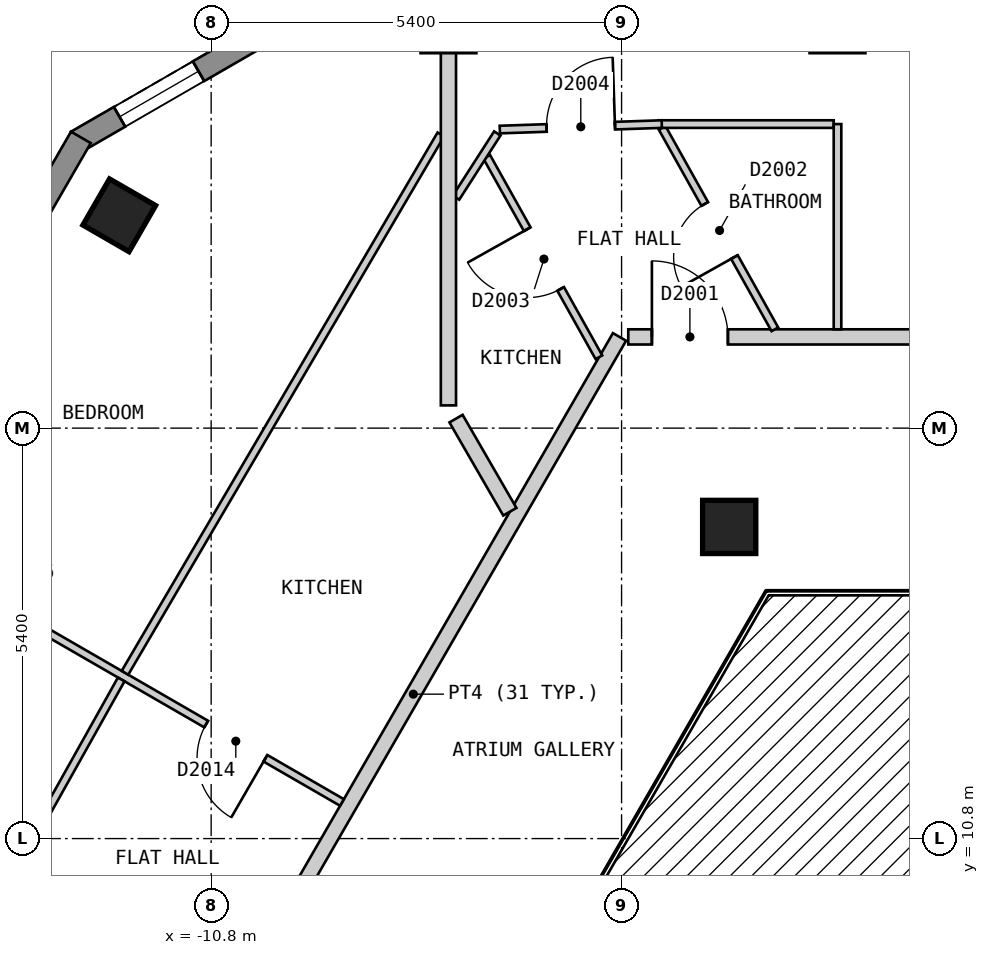
"""IFC4 building model, lengths in metres.
Left out: names, types, materials, properties, quantities, classifications, styles, units other than length and angle.
Written with IfcOpenShell. Run it as: python <this file> out.ifc"""

import sys

from ifc_helpers import new_model, si_unit, direction, frame, frame_2d, origin, origin_2d, place, context, subcontext, project, spatial, polyline, rectangle, outline, extrude, element, fill, save


model = new_model("IFC4")
c1 = context("Model", 3, precision=1e-05, world=origin(), true_north=direction((0.0, 1.0)))
c2 = subcontext(c1, "Body", "Model", "MODEL_VIEW")
j1 = project(units=[si_unit("LENGTHUNIT", "METRE"), si_unit("PLANEANGLEUNIT", "RADIAN")], contexts=[c1])
p1 = place(None, origin())
s1 = spatial("IfcSite", under=j1, at=p1, CompositionType="ELEMENT")
p2 = place(p1, origin())
s2 = spatial("IfcBuilding", under=s1, at=p2, CompositionType="ELEMENT")
p3 = place(p2, frame((0.0, 0.0, 238.8)))
s3 = spatial("IfcBuildingStorey", under=s2, at=p3, CompositionType="ELEMENT", Elevation=238.8)
for number, where, z_axis, x_axis in (
    (1, (-12.009, 19.0, 0.0), (0.0, 0.0, 1.0), (-0.5, -0.866, 0.0)),
    (2, (-3.984, 14.9, 0.0), (0.0, 0.0, 1.0), (1.0, 0.0, 0.0)),
):
    element("IfcColumn", number, at=place(p3, frame(where, z_axis=z_axis, x_axis=x_axis)), inside=s3, PredefinedType="COLUMN", context=c2, shape_type="SweptSolid", body=[
        extrude(rectangle(XDim=0.7, YDim=0.7, at=origin_2d()), origin(), (0.0, 0.0, 1.0), 3.0),
    ])
p4 = place(p3, frame((-8.239, 22.47, 0.0), z_axis=(0.0, 0.0, 1.0), x_axis=(-0.866022959057, -0.500004234368, 0.0)))
e3 = element("IfcWall", 3, at=p4, inside=s3, PredefinedType="SOLIDWALL", context=c2, shape_type="SweptSolid", body=[
    extrude(outline(polyline([(0.0, -0.15), (5.0, -0.15), (4.92, 0.15), (0.08, 0.15), (0.0, -0.15)])), origin(), (0.0, 0.0, 1.0), 2.7),
])
p5 = place(p4, frame((0.65, 0.0, 0.15)))
e4 = element("IfcOpeningElement", 4, at=p5, cuts=e3, PredefinedType="OPENING", context=c2, shape_type="SweptSolid", body=[
    extrude(rectangle(XDim=1.2, YDim=2.1, at=frame_2d((0.6, 1.05))), frame((0.0, 0.16, 0.0), z_axis=(0.0, -1.0, 0.0), x_axis=(1.0, 0.0, 0.0)), (0.0, 0.0, 1.0), 0.32),
])
p6 = place(p4, frame((3.149, 0.0, 0.15)))
e5 = element("IfcOpeningElement", 5, at=p6, cuts=e3, PredefinedType="OPENING", context=c2, shape_type="SweptSolid", body=[
    extrude(rectangle(XDim=1.2, YDim=2.1, at=frame_2d((0.6, 1.05))), frame((0.0, 0.16, 0.0), z_axis=(0.0, -1.0, 0.0), x_axis=(1.0, 0.0, 0.0)), (0.0, 0.0, 1.0), 0.32),
])
p7 = place(p3, frame((-12.514, 20.025, 0.0), z_axis=(0.0, 0.0, 1.0), x_axis=(-0.500003656944, -0.866023292436, 0.0)))
e6 = element("IfcWall", 6, at=p7, inside=s3, PredefinedType="SOLIDWALL", context=c2, shape_type="SweptSolid", body=[
    extrude(outline(polyline([(0.0, -0.15), (22.17, -0.15), (22.09, 0.15), (0.08, 0.15), (0.0, -0.15)])), origin(), (0.0, 0.0, 1.0), 2.7),
])
p8 = place(p7, frame((1.191, 0.0, 0.15)))
e7 = element("IfcOpeningElement", 7, at=p8, cuts=e6, PredefinedType="OPENING", context=c2, shape_type="SweptSolid", body=[
    extrude(rectangle(XDim=1.5, YDim=2.1, at=frame_2d((0.75, 1.05))), frame((0.0, 0.16, 0.0), z_axis=(0.0, -1.0, 0.0), x_axis=(1.0, 0.0, 0.0)), (0.0, 0.0, 1.0), 0.32),
])
p9 = place(p7, frame((3.804, 0.0, 0.15)))
e8 = element("IfcOpeningElement", 8, at=p9, cuts=e6, PredefinedType="OPENING", context=c2, shape_type="SweptSolid", body=[
    extrude(rectangle(XDim=1.5, YDim=2.1, at=frame_2d((0.75, 1.05))), frame((0.0, 0.16, 0.0), z_axis=(0.0, -1.0, 0.0), x_axis=(1.0, 0.0, 0.0)), (0.0, 0.0, 1.0), 0.32),
])
p10 = place(p7, frame((6.416, 0.0, 0.15)))
e9 = element("IfcOpeningElement", 9, at=p10, cuts=e6, PredefinedType="OPENING", context=c2, shape_type="SweptSolid", body=[
    extrude(rectangle(XDim=1.5, YDim=2.1, at=frame_2d((0.75, 1.05))), frame((0.0, 0.16, 0.0), z_axis=(0.0, -1.0, 0.0), x_axis=(1.0, 0.0, 0.0)), (0.0, 0.0, 1.0), 0.32),
])
p11 = place(p7, frame((9.029, 0.0, 0.15)))
e10 = element("IfcOpeningElement", 10, at=p11, cuts=e6, PredefinedType="OPENING", context=c2, shape_type="SweptSolid", body=[
    extrude(rectangle(XDim=1.5, YDim=2.1, at=frame_2d((0.75, 1.05))), frame((0.0, 0.16, 0.0), z_axis=(0.0, -1.0, 0.0), x_axis=(1.0, 0.0, 0.0)), (0.0, 0.0, 1.0), 0.32),
])
p12 = place(p7, frame((11.641, 0.0, 0.15)))
e11 = element("IfcOpeningElement", 11, at=p12, cuts=e6, PredefinedType="OPENING", context=c2, shape_type="SweptSolid", body=[
    extrude(rectangle(XDim=1.5, YDim=2.1, at=frame_2d((0.75, 1.05))), frame((0.0, 0.16, 0.0), z_axis=(0.0, -1.0, 0.0), x_axis=(1.0, 0.0, 0.0)), (0.0, 0.0, 1.0), 0.32),
])
p13 = place(p7, frame((14.254, 0.0, 0.15)))
e12 = element("IfcOpeningElement", 12, at=p13, cuts=e6, PredefinedType="OPENING", context=c2, shape_type="SweptSolid", body=[
    extrude(rectangle(XDim=1.5, YDim=2.1, at=frame_2d((0.75, 1.05))), frame((0.0, 0.16, 0.0), z_axis=(0.0, -1.0, 0.0), x_axis=(1.0, 0.0, 0.0)), (0.0, 0.0, 1.0), 0.32),
])
p14 = place(p7, frame((16.866, 0.0, 0.15)))
e13 = element("IfcOpeningElement", 13, at=p14, cuts=e6, PredefinedType="OPENING", context=c2, shape_type="SweptSolid", body=[
    extrude(rectangle(XDim=1.5, YDim=2.1, at=frame_2d((0.75, 1.05))), frame((0.0, 0.16, 0.0), z_axis=(0.0, -1.0, 0.0), x_axis=(1.0, 0.0, 0.0)), (0.0, 0.0, 1.0), 0.32),
])
p15 = place(p7, frame((19.479, 0.0, 0.15)))
e14 = element("IfcOpeningElement", 14, at=p15, cuts=e6, PredefinedType="OPENING", context=c2, shape_type="SweptSolid", body=[
    extrude(rectangle(XDim=1.5, YDim=2.1, at=frame_2d((0.75, 1.05))), frame((0.0, 0.16, 0.0), z_axis=(0.0, -1.0, 0.0), x_axis=(1.0, 0.0, 0.0)), (0.0, 0.0, 1.0), 0.32),
])
p16 = place(p3, frame((-5.312, 17.4, 0.0), z_axis=(0.0, 0.0, 1.0), x_axis=(1.0, 0.0, 0.0)))
e15 = element("IfcWall", 15, at=p16, inside=s3, PredefinedType="PARTITIONING", context=c2, shape_type="SweptSolid", body=[
    extrude(rectangle(XDim=10.739, YDim=0.2, at=frame_2d((5.37, 0.0))), origin(), (0.0, 0.0, 1.0), 2.7),
])
p17 = place(p16, frame((0.311, 0.0, 0.0)))
e16 = element("IfcOpeningElement", 16, at=p17, cuts=e15, PredefinedType="OPENING", context=c2, shape_type="SweptSolid", body=[
    extrude(rectangle(XDim=1.0, YDim=2.1, at=frame_2d((0.5, 1.05))), frame((0.0, 0.11, 0.0), z_axis=(0.0, -1.0, 0.0), x_axis=(1.0, 0.0, 0.0)), (0.0, 0.0, 1.0), 0.22),
])
p18 = place(p3, frame((-10.854, 8.0, 0.0), z_axis=(0.0, 0.0, 1.0), x_axis=(0.499997637144, 0.866026767976, 0.0)))
e17 = element("IfcWall", 17, at=p18, inside=s3, PredefinedType="PARTITIONING", context=c2, shape_type="SweptSolid", body=[
    extrude(rectangle(XDim=10.854, YDim=0.2, at=frame_2d((5.427, 0.0))), origin(), (0.0, 0.0, 1.0), 2.7),
])
p19 = place(p18, frame((0.612, 0.0, 0.0)))
e18 = element("IfcOpeningElement", 18, at=p19, cuts=e17, PredefinedType="OPENING", context=c2, shape_type="SweptSolid", body=[
    extrude(rectangle(XDim=1.0, YDim=2.1, at=frame_2d((0.5, 1.05))), frame((0.0, 0.11, 0.0), z_axis=(0.0, -1.0, 0.0), x_axis=(1.0, 0.0, 0.0)), (0.0, 0.0, 1.0), 0.22),
])
p20 = place(p3, frame((-7.174, 19.769, 0.0), z_axis=(0.0, 0.0, 1.0), x_axis=(0.488445917321, -0.872594170192, 0.0)))
e19 = element("IfcWall", 19, at=p20, inside=s3, PredefinedType="PARTITIONING", context=c2, shape_type="SweptSolid", body=[
    extrude(rectangle(XDim=3.022, YDim=0.1, at=frame_2d((1.511, 0.0))), origin(), (0.0, 0.0, 1.0), 2.7),
])
p21 = place(p20, frame((1.091, 0.0, 0.0)))
e20 = element("IfcOpeningElement", 20, at=p21, cuts=e19, PredefinedType="OPENING", context=c2, shape_type="SweptSolid", body=[
    extrude(rectangle(XDim=0.9, YDim=2.1, at=frame_2d((0.45, 1.05))), frame((0.0, 0.06, 0.0), z_axis=(0.0, -1.0, 0.0), x_axis=(1.0, 0.0, 0.0)), (0.0, 0.0, 1.0), 0.12),
])
p22 = place(p3, frame((-4.866, 20.15, 0.0), z_axis=(0.0, 0.0, 1.0), x_axis=(0.488343837593, -0.872651302804, 0.0)))
e21 = element("IfcWall", 21, at=p22, inside=s3, PredefinedType="PARTITIONING", context=c2, shape_type="SweptSolid", body=[
    extrude(rectangle(XDim=3.037, YDim=0.1, at=frame_2d((1.518, 0.0))), origin(), (0.0, 0.0, 1.0), 2.7),
])
p23 = place(p22, frame((1.147, 0.0, 0.0)))
e22 = element("IfcOpeningElement", 22, at=p23, cuts=e21, PredefinedType="OPENING", context=c2, shape_type="SweptSolid", body=[
    extrude(rectangle(XDim=0.8, YDim=2.1, at=frame_2d((0.4, 1.05))), frame((0.0, 0.06, 0.0), z_axis=(0.0, -1.0, 0.0), x_axis=(1.0, 0.0, 0.0)), (0.0, 0.0, 1.0), 0.12),
])
p24 = place(p3, frame((-17.926, 10.35, 0.0), z_axis=(0.0, 0.0, 1.0), x_axis=(0.866018411306, -0.500012111133, 0.0)))
e23 = element("IfcWall", 23, at=p24, inside=s3, PredefinedType="PARTITIONING", context=c2, shape_type="SweptSolid", body=[
    extrude(rectangle(XDim=9.898, YDim=0.1, at=frame_2d((4.949, 0.0))), origin(), (0.0, 0.0, 1.0), 2.7),
])
p25 = place(p24, frame((6.52, 0.0, 0.0)))
e24 = element("IfcOpeningElement", 24, at=p25, cuts=e23, PredefinedType="OPENING", context=c2, shape_type="SweptSolid", body=[
    extrude(rectangle(XDim=0.8, YDim=2.1, at=frame_2d((0.4, 1.05))), frame((0.0, 0.06, 0.0), z_axis=(0.0, -1.0, 0.0), x_axis=(1.0, 0.0, 0.0)), (0.0, 0.0, 1.0), 0.12),
])
p26 = place(p24, frame((1.521, 0.0, 0.0)))
e25 = element("IfcOpeningElement", 25, at=p26, cuts=e23, PredefinedType="OPENING", context=c2, shape_type="SweptSolid", body=[
    extrude(rectangle(XDim=0.9, YDim=2.1, at=frame_2d((0.45, 1.05))), frame((0.0, 0.06, 0.0), z_axis=(0.0, -1.0, 0.0), x_axis=(1.0, 0.0, 0.0)), (0.0, 0.0, 1.0), 0.12),
])
p27 = place(p3, frame((-15.314, 14.875, 0.0), z_axis=(0.0, 0.0, 1.0), x_axis=(0.866001485781, -0.500041424909, 0.0)))
e26 = element("IfcWall", 26, at=p27, inside=s3, PredefinedType="PARTITIONING", context=c2, shape_type="SweptSolid", body=[
    extrude(rectangle(XDim=7.2, YDim=0.1, at=frame_2d((3.6, 0.0))), origin(), (0.0, 0.0, 1.0), 2.7),
])
p28 = place(p27, frame((5.137, 0.0, 0.0)))
e27 = element("IfcOpeningElement", 27, at=p28, cuts=e26, PredefinedType="OPENING", context=c2, shape_type="SweptSolid", body=[
    extrude(rectangle(XDim=0.9, YDim=2.1, at=frame_2d((0.45, 1.05))), frame((0.0, 0.06, 0.0), z_axis=(0.0, -1.0, 0.0), x_axis=(1.0, 0.0, 0.0)), (0.0, 0.0, 1.0), 0.12),
])
p29 = place(p27, frame((1.487, 0.0, 0.0)))
e28 = element("IfcOpeningElement", 28, at=p29, cuts=e26, PredefinedType="OPENING", context=c2, shape_type="SweptSolid", body=[
    extrude(rectangle(XDim=0.9, YDim=2.1, at=frame_2d((0.45, 1.05))), frame((0.0, 0.06, 0.0), z_axis=(0.0, -1.0, 0.0), x_axis=(1.0, 0.0, 0.0)), (0.0, 0.0, 1.0), 0.12),
])
p30 = place(p3, frame((-4.914, 20.2, 0.0), z_axis=(0.0, 0.0, 1.0), x_axis=(1.0, 0.0, 0.0)))
e29 = element("IfcWall", 29, at=p30, inside=s3, PredefinedType="PARTITIONING", context=c2, shape_type="SweptSolid", body=[
    extrude(rectangle(XDim=2.305, YDim=0.1, at=frame_2d((1.153, 0.0))), origin(), (0.0, 0.0, 1.0), 2.7),
])
p31 = place(p3, frame((-7.578, 19.232, 0.0), z_axis=(0.0, 0.0, 1.0), x_axis=(0.540597871913, 0.841281130707, 0.0)))
e30 = element("IfcWall", 30, at=p31, inside=s3, PredefinedType="PARTITIONING", context=c2, shape_type="SweptSolid", body=[
    extrude(rectangle(XDim=1.004, YDim=0.1, at=frame_2d((0.502, 0.0))), origin(), (0.0, 0.0, 1.0), 2.7),
])
p32 = place(p3, frame((-11.934, 12.981, 0.0), z_axis=(0.0, 0.0, 1.0), x_axis=(0.506072703404, 0.862490822484, 0.0)))
e31 = element("IfcWall", 31, at=p32, inside=s3, PredefinedType="PARTITIONING", context=c2, shape_type="SweptSolid", body=[
    extrude(rectangle(XDim=8.212, YDim=0.1, at=frame_2d((4.106, 0.0))), origin(), (0.0, 0.0, 1.0), 2.7),
])
p33 = place(p3, frame((-14.488, 8.423, 0.0), z_axis=(0.0, 0.0, 1.0), x_axis=(0.488810791055, 0.872389827169, 0.0)))
e32 = element("IfcWall", 32, at=p33, inside=s3, PredefinedType="PARTITIONING", context=c2, shape_type="SweptSolid", body=[
    extrude(rectangle(XDim=5.125, YDim=0.1, at=frame_2d((2.562, 0.0))), origin(), (0.0, 0.0, 1.0), 2.7),
])
p34 = place(p33, frame((2.113, 0.0, 0.0)))
e33 = element("IfcOpeningElement", 33, at=p34, cuts=e32, PredefinedType="OPENING", context=c2, shape_type="SweptSolid", body=[
    extrude(rectangle(XDim=0.9, YDim=2.1, at=frame_2d((0.45, 1.05))), frame((0.0, 0.06, 0.0), z_axis=(0.0, -1.0, 0.0), x_axis=(1.0, 0.0, 0.0)), (0.0, 0.0, 1.0), 0.12),
])
p35 = place(p3, frame((-2.559, 17.5, 0.0), z_axis=(0.0, 0.0, 1.0), x_axis=(0.0, 1.0, 0.0)))
e34 = element("IfcWall", 34, at=p35, inside=s3, PredefinedType="PARTITIONING", context=c2, shape_type="SweptSolid", body=[
    extrude(rectangle(XDim=2.7, YDim=0.1, at=frame_2d((1.35, 0.0))), origin(), (0.0, 0.0, 1.0), 2.7),
])
p36 = place(p3, frame((-7.002, 20.128, 0.0), z_axis=(0.0, 0.0, 1.0), x_axis=(0.999429293715, 0.033779977274, 0.0)))
e35 = element("IfcWall", 35, at=p36, inside=s3, PredefinedType="PARTITIONING", context=c2, shape_type="SweptSolid", body=[
    extrude(rectangle(XDim=2.132, YDim=0.1, at=frame_2d((1.066, 0.0))), origin(), (0.0, 0.0, 1.0), 2.7),
])
p37 = place(p36, frame((0.616, 0.0, 0.0)))
e36 = element("IfcOpeningElement", 36, at=p37, cuts=e35, PredefinedType="OPENING", context=c2, shape_type="SweptSolid", body=[
    extrude(rectangle(XDim=0.9, YDim=2.1, at=frame_2d((0.45, 1.05))), frame((0.0, 0.06, 0.0), z_axis=(0.0, -1.0, 0.0), x_axis=(1.0, 0.0, 0.0)), (0.0, 0.0, 1.0), 0.12),
])
p38 = place(p3, frame((-7.578, 16.325, 0.0), z_axis=(0.0, 0.0, 1.0), x_axis=(0.500314976313, -0.865843475737, 0.0)))
e37 = element("IfcWall", 37, at=p38, inside=s3, PredefinedType="PARTITIONING", context=c2, shape_type="SweptSolid", body=[
    extrude(rectangle(XDim=1.415, YDim=0.2, at=frame_2d((0.707, 0.0))), origin(), (0.0, 0.0, 1.0), 2.7),
])
p39 = place(p3, frame((-7.678, 16.499, 0.0), z_axis=(0.0, 0.0, 1.0), x_axis=(0.0, 1.0, 0.0)))
e38 = element("IfcWall", 38, at=p39, inside=s3, PredefinedType="PARTITIONING", context=c2, shape_type="SweptSolid", body=[
    extrude(rectangle(XDim=5.801, YDim=0.2, at=frame_2d((2.9, 0.0))), origin(), (0.0, 0.0, 1.0), 2.7),
])
p40 = place(p6, origin())
e39 = element("IfcWindow", 39, at=p40, inside=s3, PartitioningType="SINGLE_PANEL", PredefinedType="WINDOW", context=c2, shape_type="SweptSolid", body=[
    extrude(rectangle(XDim=1.2, YDim=2.1, at=frame_2d((0.6, 1.05))), frame((0.0, 0.03, 0.0), z_axis=(0.0, -1.0, 0.0), x_axis=(1.0, 0.0, 0.0)), (0.0, 0.0, 1.0), 0.06),
])
fill(e5, e39)
p41 = place(p17, origin())
e40 = element("IfcDoor", 40, at=p41, inside=s3, OperationType="SINGLE_SWING_LEFT", PredefinedType="DOOR", context=c2, shape_type="SweptSolid", body=[
    extrude(rectangle(XDim=1.0, YDim=2.1, at=frame_2d((0.5, 1.05))), frame((0.0, 0.025, 0.0), z_axis=(0.0, -1.0, 0.0), x_axis=(1.0, 0.0, 0.0)), (0.0, 0.0, 1.0), 0.05),
])
fill(e16, e40)
p42 = place(p23, origin())
e41 = element("IfcDoor", 41, at=p42, inside=s3, OperationType="SINGLE_SWING_RIGHT", PredefinedType="DOOR", context=c2, shape_type="SweptSolid", body=[
    extrude(rectangle(XDim=0.8, YDim=2.1, at=frame_2d((0.4, 1.05))), frame((0.0, 0.025, 0.0), z_axis=(0.0, -1.0, 0.0), x_axis=(1.0, 0.0, 0.0)), (0.0, 0.0, 1.0), 0.05),
])
fill(e22, e41)
p43 = place(p21, origin())
e42 = element("IfcDoor", 42, at=p43, inside=s3, OperationType="SINGLE_SWING_LEFT", PredefinedType="DOOR", context=c2, shape_type="SweptSolid", body=[
    extrude(rectangle(XDim=0.9, YDim=2.1, at=frame_2d((0.45, 1.05))), frame((0.0, 0.025, 0.0), z_axis=(0.0, -1.0, 0.0), x_axis=(1.0, 0.0, 0.0)), (0.0, 0.0, 1.0), 0.05),
])
fill(e20, e42)
p44 = place(p37, origin())
e43 = element("IfcDoor", 43, at=p44, inside=s3, OperationType="SINGLE_SWING_RIGHT", PredefinedType="DOOR", context=c2, shape_type="SweptSolid", body=[
    extrude(rectangle(XDim=0.9, YDim=2.1, at=frame_2d((0.45, 1.05))), frame((0.0, 0.025, 0.0), z_axis=(0.0, -1.0, 0.0), x_axis=(1.0, 0.0, 0.0)), (0.0, 0.0, 1.0), 0.05),
])
fill(e36, e43)
p45 = place(p28, origin())
e44 = element("IfcDoor", 44, at=p45, inside=s3, OperationType="SINGLE_SWING_RIGHT", PredefinedType="DOOR", context=c2, shape_type="SweptSolid", body=[
    extrude(rectangle(XDim=0.9, YDim=2.1, at=frame_2d((0.45, 1.05))), frame((0.0, 0.025, 0.0), z_axis=(0.0, -1.0, 0.0), x_axis=(1.0, 0.0, 0.0)), (0.0, 0.0, 1.0), 0.05),
])
fill(e27, e44)
save(model, sys.argv[1])
